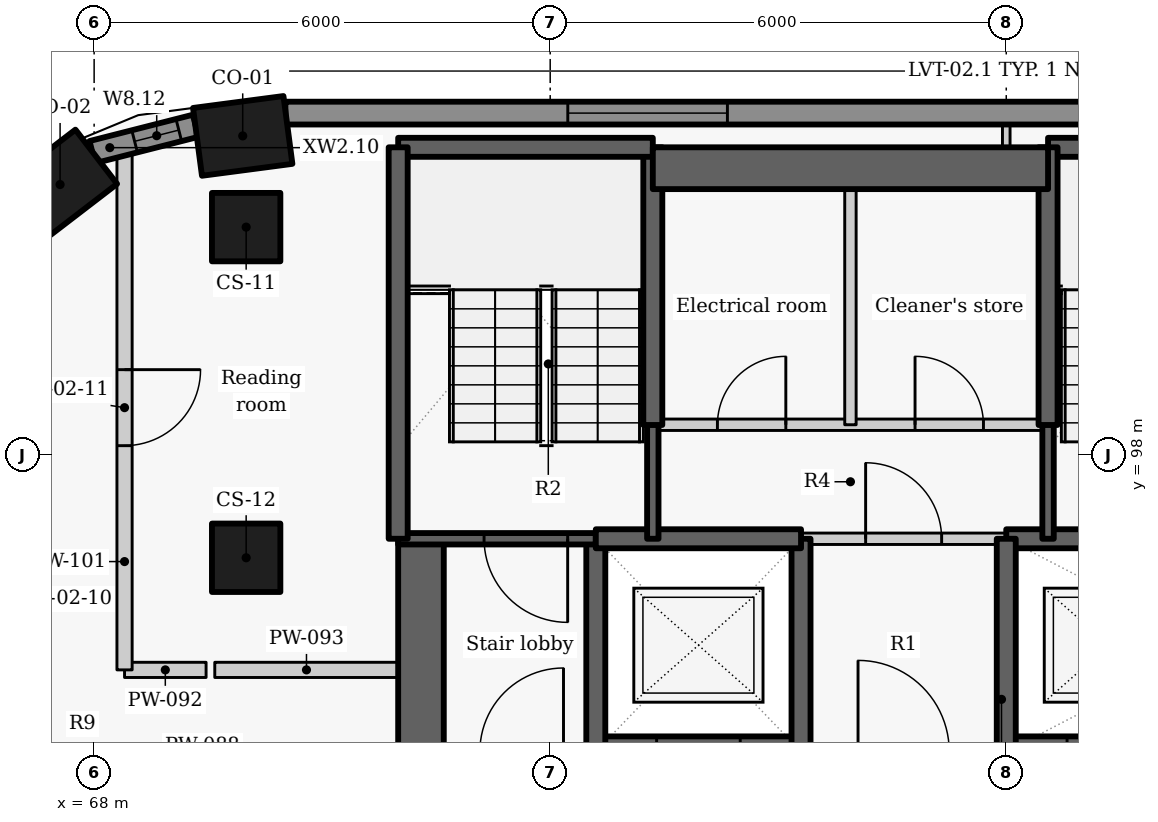
"""IFC4 building model, lengths in metres.
Left out: names, types, materials, properties, quantities, classifications, styles, units other than length and angle.
Written with IfcOpenShell. Run it as: python <this file> out.ifc"""

import sys

from ifc_helpers import new_model, si_unit, direction, frame, frame_2d, origin, origin_2d, place, context, subcontext, project, spatial, rectangle, extrude, element, fill, save


model = new_model("IFC4")
c1 = context("Model", 3, precision=1e-05, world=origin(), true_north=direction((0.0, 1.0)))
c2 = subcontext(c1, "Body", "Model", "MODEL_VIEW")
j1 = project(units=[si_unit("LENGTHUNIT", "METRE"), si_unit("PLANEANGLEUNIT", "RADIAN")], contexts=[c1])
p1 = place(None, origin())
s1 = spatial("IfcSite", under=j1, at=p1, CompositionType="ELEMENT")
p2 = place(p1, origin())
s2 = spatial("IfcBuilding", under=s1, at=p2, CompositionType="ELEMENT")
p3 = place(p2, frame((0.0, 0.0, 193.2)))
s3 = spatial("IfcBuildingStorey", under=s2, at=p3, CompositionType="ELEMENT", Elevation=193.2)
for number, where, z_axis, x_axis in (
    (1, (69.955, 102.2, 0.0), (0.0, 0.0, 1.0), (-0.991, -0.131, 0.0)),
    (2, (67.552, 101.56, 0.0), (0.0, 0.0, 1.0), (-0.793, -0.609, 0.0)),
):
    element("IfcColumn", number, at=place(p3, frame(where, z_axis=z_axis, x_axis=x_axis)), inside=s3, PredefinedType="COLUMN", context=c2, shape_type="SweptSolid", body=[
        extrude(rectangle(XDim=1.2, YDim=0.9, at=origin_2d()), origin(), (0.0, 0.0, 1.0), 3.3),
    ])
for number, where, z_axis, x_axis in (
    (3, (70.0, 101.0, 0.0), (0.0, 0.0, 1.0), (0.0, -1.0, 0.0)),
    (4, (70.0, 96.65, 0.0), (0.0, 0.0, 1.0), (0.0, -1.0, 0.0)),
):
    element("IfcColumn", number, at=place(p3, frame(where, z_axis=z_axis, x_axis=x_axis)), inside=s3, PredefinedType="COLUMN", context=c2, shape_type="SweptSolid", body=[
        extrude(rectangle(XDim=0.9, YDim=0.9, at=origin_2d()), origin(), (0.0, 0.0, 1.0), 3.3),
    ])
p4 = place(p3, frame((89.449, 102.5, 0.0), z_axis=(0.0, 0.0, 1.0), x_axis=(-1.0, 0.0, 0.0)))
e5 = element("IfcWall", 5, at=p4, inside=s3, PredefinedType="SOLIDWALL", context=c2, shape_type="SweptSolid", body=[
    extrude(rectangle(XDim=18.933, YDim=0.3, at=frame_2d((9.466, 0.0))), origin(), (0.0, 0.0, 1.0), 2.425),
])
p5 = place(p4, frame((3.687, 0.0, 0.9)))
e6 = element("IfcOpeningElement", 6, at=p5, cuts=e5, PredefinedType="OPENING", context=c2, shape_type="SweptSolid", body=[
    extrude(rectangle(XDim=2.1, YDim=1.1, at=frame_2d((1.05, 0.55))), frame((0.0, 0.16, 0.0), z_axis=(0.0, -1.0, 0.0), x_axis=(1.0, 0.0, 0.0)), (0.0, 0.0, 1.0), 0.32),
])
p6 = place(p4, frame((13.118, 0.0, 0.9)))
e7 = element("IfcOpeningElement", 7, at=p6, cuts=e5, PredefinedType="OPENING", context=c2, shape_type="SweptSolid", body=[
    extrude(rectangle(XDim=2.1, YDim=1.1, at=frame_2d((1.05, 0.55))), frame((0.0, 0.16, 0.0), z_axis=(0.0, -1.0, 0.0), x_axis=(1.0, 0.0, 0.0)), (0.0, 0.0, 1.0), 0.32),
])
p7 = place(p3, frame((69.336, 102.333, 0.0), z_axis=(0.0, 0.0, 1.0), x_axis=(-0.969037396898, -0.246914000036, 0.0)))
e8 = element("IfcWall", 8, at=p7, inside=s3, PredefinedType="SOLIDWALL", context=c2, shape_type="SweptSolid", body=[
    extrude(rectangle(XDim=1.403, YDim=0.3, at=frame_2d((0.702, 0.0))), origin(), (0.0, 0.0, 1.0), 2.425),
])
p8 = place(p7, frame((0.229, 0.0, 0.9)))
e9 = element("IfcOpeningElement", 9, at=p8, cuts=e8, PredefinedType="OPENING", context=c2, shape_type="SweptSolid", body=[
    extrude(rectangle(XDim=0.6, YDim=1.1, at=frame_2d((0.3, 0.55))), frame((0.0, 0.16, 0.0), z_axis=(0.0, -1.0, 0.0), x_axis=(1.0, 0.0, 0.0)), (0.0, 0.0, 1.0), 0.32),
])
p9 = place(p3, frame((72.3, 87.8, -0.275), z_axis=(0.0, 0.0, 1.0), x_axis=(0.0, 1.0, 0.0)))
e10 = element("IfcWall", 10, at=p9, inside=s3, PredefinedType="SHEAR", context=c2, shape_type="SweptSolid", body=[
    extrude(rectangle(XDim=9.1, YDim=0.6, at=frame_2d((4.55, 0.0))), origin(), (0.0, 0.0, 1.0), 3.3),
])
p10 = place(p9, frame((3.852, 0.0, 0.275)))
e11 = element("IfcOpeningElement", 11, at=p10, cuts=e10, PredefinedType="OPENING", context=c2, shape_type="SweptSolid", body=[
    extrude(rectangle(XDim=1.5, YDim=2.1, at=frame_2d((0.75, 1.05))), frame((0.0, 0.31, 0.0), z_axis=(0.0, -1.0, 0.0), x_axis=(1.0, 0.0, 0.0)), (0.0, 0.0, 1.0), 0.62),
])
p11 = place(p3, frame((74.597, 94.1, -0.275), z_axis=(0.0, 0.0, 1.0), x_axis=(1.0, 0.0, 0.0)))
e12 = element("IfcWall", 12, at=p11, inside=s3, PredefinedType="SHEAR", context=c2, shape_type="SweptSolid", body=[
    extrude(rectangle(XDim=2.706, YDim=0.4, at=frame_2d((1.353, 0.0))), origin(), (0.0, 0.0, 1.0), 3.3),
])
p12 = place(p11, frame((0.803, 0.0, 0.275)))
e13 = element("IfcOpeningElement", 13, at=p12, cuts=e12, PredefinedType="OPENING", context=c2, shape_type="SweptSolid", body=[
    extrude(rectangle(XDim=1.1, YDim=2.1, at=frame_2d((0.55, 1.05))), frame((0.0, 0.21, 0.0), z_axis=(0.0, -1.0, 0.0), x_axis=(1.0, 0.0, 0.0)), (0.0, 0.0, 1.0), 0.42),
])
p13 = place(p3, frame((79.997, 94.1, -0.275), z_axis=(0.0, 0.0, 1.0), x_axis=(1.0, 0.0, 0.0)))
e14 = element("IfcWall", 14, at=p13, inside=s3, PredefinedType="SHEAR", context=c2, shape_type="SweptSolid", body=[
    extrude(rectangle(XDim=5.406, YDim=0.4, at=frame_2d((2.703, 0.0))), origin(), (0.0, 0.0, 1.0), 3.3),
])
p14 = place(p13, frame((0.803, 0.0, 0.275)))
e15 = element("IfcOpeningElement", 15, at=p14, cuts=e14, PredefinedType="OPENING", context=c2, shape_type="SweptSolid", body=[
    extrude(rectangle(XDim=1.1, YDim=2.1, at=frame_2d((0.55, 1.05))), frame((0.0, 0.21, 0.0), z_axis=(0.0, -1.0, 0.0), x_axis=(1.0, 0.0, 0.0)), (0.0, 0.0, 1.0), 0.42),
])
p15 = place(p3, frame((74.6, 94.1, -0.275), z_axis=(0.0, 0.0, 1.0), x_axis=(0.0, 1.0, 0.0)))
e16 = element("IfcWall", 16, at=p15, inside=s3, PredefinedType="SHEAR", context=c2, shape_type="SweptSolid", body=[
    extrude(rectangle(XDim=2.8, YDim=0.25, at=frame_2d((1.4, 0.0))), origin(), (0.0, 0.0, 1.0), 3.3),
])
p16 = place(p3, frame((74.6, 96.9, -0.275), z_axis=(0.0, 0.0, 1.0), x_axis=(-1.0, 0.0, 0.0)))
e17 = element("IfcWall", 17, at=p16, inside=s3, PredefinedType="SHEAR", context=c2, shape_type="SweptSolid", body=[
    extrude(rectangle(XDim=2.6, YDim=0.15, at=frame_2d((1.3, 0.0))), origin(), (0.0, 0.0, 1.0), 3.3),
])
p17 = place(p16, frame((0.37, 0.0, 0.275)))
e18 = element("IfcOpeningElement", 18, at=p17, cuts=e17, PredefinedType="OPENING", context=c2, shape_type="SweptSolid", body=[
    extrude(rectangle(XDim=1.1, YDim=2.1, at=frame_2d((0.55, 1.05))), frame((0.0, 0.085, 0.0), z_axis=(0.0, -1.0, 0.0), x_axis=(1.0, 0.0, 0.0)), (0.0, 0.0, 1.0), 0.17),
])
p18 = place(p3, frame((77.3, 94.1, -0.275), z_axis=(0.0, 0.0, 1.0), x_axis=(0.0, 1.0, 0.0)))
e19 = element("IfcWall", 19, at=p18, inside=s3, PredefinedType="SHEAR", context=c2, shape_type="SweptSolid", body=[
    extrude(rectangle(XDim=2.8, YDim=0.25, at=frame_2d((1.4, 0.0))), origin(), (0.0, 0.0, 1.0), 3.3),
])
p19 = place(p3, frame((74.6, 96.9, -0.275), z_axis=(0.0, 0.0, 1.0), x_axis=(1.0, 0.0, 0.0)))
e20 = element("IfcWall", 20, at=p19, inside=s3, PredefinedType="SHEAR", context=c2, shape_type="SweptSolid", body=[
    extrude(rectangle(XDim=2.7, YDim=0.25, at=frame_2d((1.35, 0.0))), origin(), (0.0, 0.0, 1.0), 3.3),
])
p20 = place(p3, frame((80.0, 96.9, -0.275), z_axis=(0.0, 0.0, 1.0), x_axis=(1.0, 0.0, 0.0)))
e21 = element("IfcWall", 21, at=p20, inside=s3, PredefinedType="SHEAR", context=c2, shape_type="SweptSolid", body=[
    extrude(rectangle(XDim=8.0, YDim=0.25, at=frame_2d((4.0, 0.0))), origin(), (0.0, 0.0, 1.0), 3.3),
])
p21 = place(p20, frame((3.849, 0.0, 0.275)))
e22 = element("IfcOpeningElement", 22, at=p21, cuts=e21, PredefinedType="OPENING", context=c2, shape_type="SweptSolid", body=[
    extrude(rectangle(XDim=1.1, YDim=2.1, at=frame_2d((0.55, 1.05))), frame((0.0, 0.135, 0.0), z_axis=(0.0, -1.0, 0.0), x_axis=(1.0, 0.0, 0.0)), (0.0, 0.0, 1.0), 0.27),
])
p22 = place(p3, frame((80.0, 94.1, -0.275), z_axis=(0.0, 0.0, 1.0), x_axis=(0.0, 1.0, 0.0)))
e23 = element("IfcWall", 23, at=p22, inside=s3, PredefinedType="SHEAR", context=c2, shape_type="SweptSolid", body=[
    extrude(rectangle(XDim=2.8, YDim=0.25, at=frame_2d((1.4, 0.0))), origin(), (0.0, 0.0, 1.0), 3.3),
])
p23 = place(p3, frame((77.3, 96.9, 0.0), z_axis=(0.0, 0.0, 1.0), x_axis=(1.0, 0.0, 0.0)))
e24 = element("IfcWall", 24, at=p23, inside=s3, PredefinedType="PARTITIONING", context=c2, shape_type="SweptSolid", body=[
    extrude(rectangle(XDim=2.7, YDim=0.15, at=frame_2d((1.35, 0.0))), origin(), (0.0, 0.0, 1.0), 3.025),
])
p24 = place(p23, frame((0.85, 0.0, 0.0)))
e25 = element("IfcOpeningElement", 25, at=p24, cuts=e24, PredefinedType="OPENING", context=c2, shape_type="SweptSolid", body=[
    extrude(rectangle(XDim=1.0, YDim=2.1, at=frame_2d((0.5, 1.05))), frame((0.0, 0.085, 0.0), z_axis=(0.0, -1.0, 0.0), x_axis=(1.0, 0.0, 0.0)), (0.0, 0.0, 1.0), 0.17),
])
p25 = place(p3, frame((75.35, 96.9, -0.275), z_axis=(0.0, 0.0, 1.0), x_axis=(0.0, 1.0, 0.0)))
e26 = element("IfcWall", 26, at=p25, inside=s3, PredefinedType="SHEAR", context=c2, shape_type="SweptSolid", body=[
    extrude(rectangle(XDim=1.503, YDim=0.15, at=frame_2d((0.751, 0.0))), origin(), (0.0, 0.0, 1.0), 3.3),
])
p26 = place(p3, frame((75.35, 98.397, -0.275), z_axis=(0.0, 0.0, 1.0), x_axis=(0.0, 1.0, 0.0)))
e27 = element("IfcWall", 27, at=p26, inside=s3, PredefinedType="SHEAR", context=c2, shape_type="SweptSolid", body=[
    extrude(rectangle(XDim=3.653, YDim=0.25, at=frame_2d((1.827, 0.0))), origin(), (0.0, 0.0, 1.0), 3.3),
])
p27 = place(p3, frame((72.0, 102.05, -0.275), z_axis=(0.0, 0.0, 1.0), x_axis=(1.0, 0.0, 0.0)))
e28 = element("IfcWall", 28, at=p27, inside=s3, PredefinedType="SHEAR", context=c2, shape_type="SweptSolid", body=[
    extrude(rectangle(XDim=3.35, YDim=0.25, at=frame_2d((1.675, 0.0))), origin(), (0.0, 0.0, 1.0), 3.3),
])
p28 = place(p3, frame((80.55, 102.05, -0.275), z_axis=(0.0, 0.0, 1.0), x_axis=(1.0, 0.0, 0.0)))
e29 = element("IfcWall", 29, at=p28, inside=s3, PredefinedType="SHEAR", context=c2, shape_type="SweptSolid", body=[
    extrude(rectangle(XDim=2.85, YDim=0.25, at=frame_2d((1.425, 0.0))), origin(), (0.0, 0.0, 1.0), 3.3),
])
p29 = place(p3, frame((72.0, 96.9, -0.275), z_axis=(0.0, 0.0, 1.0), x_axis=(0.0, 1.0, 0.0)))
e30 = element("IfcWall", 30, at=p29, inside=s3, PredefinedType="SHEAR", context=c2, shape_type="SweptSolid", body=[
    extrude(rectangle(XDim=5.15, YDim=0.25, at=frame_2d((2.575, 0.0))), origin(), (0.0, 0.0, 1.0), 3.3),
])
p30 = place(p3, frame((80.55, 96.9, -0.275), z_axis=(0.0, 0.0, 1.0), x_axis=(0.0, 1.0, 0.0)))
e31 = element("IfcWall", 31, at=p30, inside=s3, PredefinedType="SHEAR", context=c2, shape_type="SweptSolid", body=[
    extrude(rectangle(XDim=1.503, YDim=0.15, at=frame_2d((0.751, 0.0))), origin(), (0.0, 0.0, 1.0), 3.3),
])
p31 = place(p3, frame((80.55, 98.397, -0.275), z_axis=(0.0, 0.0, 1.0), x_axis=(0.0, 1.0, 0.0)))
e32 = element("IfcWall", 32, at=p31, inside=s3, PredefinedType="SHEAR", context=c2, shape_type="SweptSolid", body=[
    extrude(rectangle(XDim=3.653, YDim=0.25, at=frame_2d((1.827, 0.0))), origin(), (0.0, 0.0, 1.0), 3.3),
])
p32 = place(p3, frame((75.35, 101.775, -0.275), z_axis=(0.0, 0.0, 1.0), x_axis=(1.0, 0.0, 0.0)))
e33 = element("IfcWall", 33, at=p32, inside=s3, PredefinedType="SHEAR", context=c2, shape_type="SweptSolid", body=[
    extrude(rectangle(XDim=5.2, YDim=0.55, at=frame_2d((2.6, 0.0))), origin(), (0.0, 0.0, 1.0), 3.3),
])
p33 = place(p3, frame((75.35, 98.4, 0.0), z_axis=(0.0, 0.0, 1.0), x_axis=(1.0, 0.0, 0.0)))
e34 = element("IfcWall", 34, at=p33, inside=s3, PredefinedType="PARTITIONING", context=c2, shape_type="SweptSolid", body=[
    extrude(rectangle(XDim=5.2, YDim=0.15, at=frame_2d((2.6, 0.0))), origin(), (0.0, 0.0, 1.0), 3.025),
])
p34 = place(p33, frame((0.85, 0.0, 0.0)))
e35 = element("IfcOpeningElement", 35, at=p34, cuts=e34, PredefinedType="OPENING", context=c2, shape_type="SweptSolid", body=[
    extrude(rectangle(XDim=0.9, YDim=2.1, at=frame_2d((0.45, 1.05))), frame((0.0, 0.085, 0.0), z_axis=(0.0, -1.0, 0.0), x_axis=(1.0, 0.0, 0.0)), (0.0, 0.0, 1.0), 0.17),
])
p35 = place(p33, frame((3.45, 0.0, 0.0)))
e36 = element("IfcOpeningElement", 36, at=p35, cuts=e34, PredefinedType="OPENING", context=c2, shape_type="SweptSolid", body=[
    extrude(rectangle(XDim=0.9, YDim=2.1, at=frame_2d((0.45, 1.05))), frame((0.0, 0.085, 0.0), z_axis=(0.0, -1.0, 0.0), x_axis=(1.0, 0.0, 0.0)), (0.0, 0.0, 1.0), 0.17),
])
p36 = place(p3, frame((77.95, 98.4, 0.0), z_axis=(0.0, 0.0, 1.0), x_axis=(0.0, 1.0, 0.0)))
e37 = element("IfcWall", 37, at=p36, inside=s3, PredefinedType="PARTITIONING", context=c2, shape_type="SweptSolid", body=[
    extrude(rectangle(XDim=3.65, YDim=0.15, at=frame_2d((1.825, 0.0))), origin(), (0.0, 0.0, 1.0), 3.025),
])
p37 = place(p3, frame((68.4, 95.175, 0.0), z_axis=(0.0, 0.0, 1.0), x_axis=(1.0, 0.0, 0.0)))
e38 = element("IfcWall", 38, at=p37, inside=s3, PredefinedType="PARTITIONING", context=c2, shape_type="SweptSolid", body=[
    extrude(rectangle(XDim=1.073, YDim=0.2, at=frame_2d((0.537, 0.0))), origin(), (0.0, 0.0, 1.0), 3.025),
])
p38 = place(p3, frame((69.587, 95.175, 0.0), z_axis=(0.0, 0.0, 1.0), x_axis=(1.0, 0.0, 0.0)))
e39 = element("IfcWall", 39, at=p38, inside=s3, PredefinedType="PARTITIONING", context=c2, shape_type="SweptSolid", body=[
    extrude(rectangle(XDim=2.413, YDim=0.2, at=frame_2d((1.207, 0.0))), origin(), (0.0, 0.0, 1.0), 2.505),
])
p39 = place(p3, frame((68.4, 102.074, 0.0), z_axis=(0.0, 0.0, 1.0), x_axis=(0.0, -1.0, 0.0)))
e40 = element("IfcWall", 40, at=p39, inside=s3, PredefinedType="PARTITIONING", context=c2, shape_type="SweptSolid", body=[
    extrude(rectangle(XDim=6.899, YDim=0.2, at=frame_2d((3.449, 0.0))), origin(), (0.0, 0.0, 1.0), 2.405),
])
p40 = place(p39, frame((2.949, 0.0, 0.0)))
e41 = element("IfcOpeningElement", 41, at=p40, cuts=e40, PredefinedType="OPENING", context=c2, shape_type="SweptSolid", body=[
    extrude(rectangle(XDim=1.0, YDim=2.1, at=frame_2d((0.5, 1.05))), frame((0.0, 0.11, 0.0), z_axis=(0.0, -1.0, 0.0), x_axis=(1.0, 0.0, 0.0)), (0.0, 0.0, 1.0), 0.22),
])
p41 = place(p3, frame((80.0, 102.05, 0.0), z_axis=(0.0, 0.0, 1.0), x_axis=(0.0, 1.0, 0.0)))
e42 = element("IfcWall", 42, at=p41, inside=s3, PredefinedType="PARTITIONING", context=c2, shape_type="SweptSolid", body=[
    extrude(rectangle(XDim=0.3, YDim=0.1, at=frame_2d((0.15, 0.0))), origin(), (0.0, 0.0, 1.0), 3.025),
])
p42 = place(p6, origin())
e43 = element("IfcWindow", 43, at=p42, inside=s3, PartitioningType="SINGLE_PANEL", PredefinedType="WINDOW", context=c2, shape_type="SweptSolid", body=[
    extrude(rectangle(XDim=2.1, YDim=1.1, at=frame_2d((1.05, 0.55))), frame((0.0, 0.03, 0.0), z_axis=(0.0, -1.0, 0.0), x_axis=(1.0, 0.0, 0.0)), (0.0, 0.0, 1.0), 0.06),
])
fill(e7, e43)
p43 = place(p8, origin())
e44 = element("IfcWindow", 44, at=p43, inside=s3, PartitioningType="SINGLE_PANEL", PredefinedType="WINDOW", context=c2, shape_type="SweptSolid", body=[
    extrude(rectangle(XDim=0.6, YDim=1.1, at=frame_2d((0.3, 0.55))), frame((0.0, 0.03, 0.0), z_axis=(0.0, -1.0, 0.0), x_axis=(1.0, 0.0, 0.0)), (0.0, 0.0, 1.0), 0.06),
])
fill(e9, e44)
p44 = place(p24, origin())
e45 = element("IfcDoor", 45, at=p44, inside=s3, OperationType="SINGLE_SWING_LEFT", PredefinedType="DOOR", context=c2, shape_type="SweptSolid", body=[
    extrude(rectangle(XDim=1.0, YDim=2.1, at=frame_2d((0.5, 1.05))), frame((0.0, 0.025, 0.0), z_axis=(0.0, -1.0, 0.0), x_axis=(1.0, 0.0, 0.0)), (0.0, 0.0, 1.0), 0.05),
])
fill(e25, e45)
p45 = place(p34, origin())
e46 = element("IfcDoor", 46, at=p45, inside=s3, OperationType="SINGLE_SWING_RIGHT", PredefinedType="DOOR", context=c2, shape_type="SweptSolid", body=[
    extrude(rectangle(XDim=0.9, YDim=2.1, at=frame_2d((0.45, 1.05))), frame((0.0, 0.025, 0.0), z_axis=(0.0, -1.0, 0.0), x_axis=(1.0, 0.0, 0.0)), (0.0, 0.0, 1.0), 0.05),
])
fill(e35, e46)
p46 = place(p35, origin())
e47 = element("IfcDoor", 47, at=p46, inside=s3, OperationType="SINGLE_SWING_LEFT", PredefinedType="DOOR", context=c2, shape_type="SweptSolid", body=[
    extrude(rectangle(XDim=0.9, YDim=2.1, at=frame_2d((0.45, 1.05))), frame((0.0, 0.025, 0.0), z_axis=(0.0, -1.0, 0.0), x_axis=(1.0, 0.0, 0.0)), (0.0, 0.0, 1.0), 0.05),
])
fill(e36, e47)
p47 = place(p17, origin())
e48 = element("IfcDoor", 48, at=p47, inside=s3, OperationType="SINGLE_SWING_LEFT", PredefinedType="DOOR", context=c2, shape_type="SweptSolid", body=[
    extrude(rectangle(XDim=1.1, YDim=2.1, at=frame_2d((0.55, 1.05))), frame((0.0, 0.025, 0.0), z_axis=(0.0, -1.0, 0.0), x_axis=(1.0, 0.0, 0.0)), (0.0, 0.0, 1.0), 0.05),
])
fill(e18, e48)
p48 = place(p40, origin())
e49 = element("IfcDoor", 49, at=p48, inside=s3, OperationType="SINGLE_SWING_LEFT", PredefinedType="DOOR", context=c2, shape_type="SweptSolid", body=[
    extrude(rectangle(XDim=1.0, YDim=2.1, at=frame_2d((0.5, 1.05))), frame((0.0, 0.025, 0.0), z_axis=(0.0, -1.0, 0.0), x_axis=(1.0, 0.0, 0.0)), (0.0, 0.0, 1.0), 0.05),
])
fill(e41, e49)
save(model, sys.argv[1])
